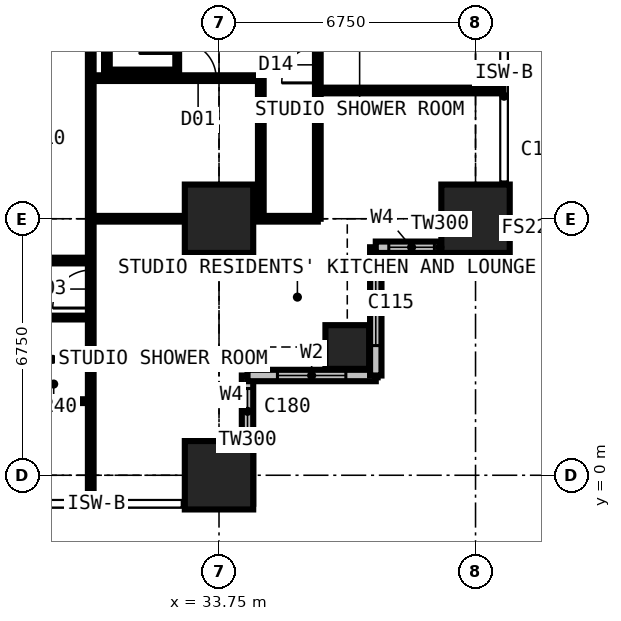
"""IFC4 building model, lengths in metres.
Left out: names, types, materials, properties, quantities, classifications, styles, units other than length and angle.
Written with IfcOpenShell. Run it as: python <this file> out.ifc"""

import sys

from ifc_helpers import new_model, si_unit, direction, frame, frame_2d, origin, origin_2d, place, context, subcontext, project, spatial, rectangle, extrude, element, fill, save


model = new_model("IFC4")
c1 = context("Model", 3, precision=1e-05, world=origin(), true_north=direction((0.0, 1.0)))
c2 = subcontext(c1, "Body", "Model", "MODEL_VIEW")
j1 = project(units=[si_unit("LENGTHUNIT", "METRE"), si_unit("PLANEANGLEUNIT", "RADIAN")], contexts=[c1])
p1 = place(None, origin())
s1 = spatial("IfcSite", under=j1, at=p1, CompositionType="ELEMENT")
p2 = place(p1, origin())
s2 = spatial("IfcBuilding", under=s1, at=p2, CompositionType="ELEMENT")
p3 = place(p2, frame((0.0, 0.0, 83.7)))
s3 = spatial("IfcBuildingStorey", under=s2, at=p3, CompositionType="ELEMENT", Elevation=83.7)
for number, where, z_axis, x_axis in (
    (1, (33.75, 0.0, 0.0), (0.0, 0.0, 1.0), (1.0, 0.0, 0.0)),
    (2, (33.75, 6.75, 0.0), (0.0, 0.0, 1.0), (1.0, 0.0, 0.0)),
):
    element("IfcColumn", number, at=place(p3, frame(where, z_axis=z_axis, x_axis=x_axis)), inside=s3, PredefinedType="COLUMN", context=c2, shape_type="SweptSolid", body=[
        extrude(rectangle(XDim=1.8, YDim=1.8, at=origin_2d()), origin(), (0.0, 0.0, 1.0), 3.6),
    ])
p4 = place(p3, frame((37.125, 3.375, 0.0), z_axis=(0.0, 0.0, 1.0), x_axis=(1.0, 0.0, 0.0)))
e3 = element("IfcColumn", 3, at=p4, inside=s3, PredefinedType="COLUMN", context=c2, shape_type="SweptSolid", body=[
    extrude(rectangle(XDim=1.15, YDim=1.15, at=origin_2d()), origin(), (0.0, 0.0, 1.0), 3.6),
])
p5 = place(p3, frame((40.5, 6.75, 0.0), z_axis=(0.0, 0.0, 1.0), x_axis=(1.0, 0.0, 0.0)))
e4 = element("IfcColumn", 4, at=p5, inside=s3, PredefinedType="COLUMN", context=c2, shape_type="SweptSolid", body=[
    extrude(rectangle(XDim=1.8, YDim=1.8, at=origin_2d()), origin(), (0.0, 0.0, 1.0), 3.6),
])
p6 = place(p3, frame((34.5, -0.75, 0.0), z_axis=(0.0, 0.0, 1.0), x_axis=(0.0, 1.0, 0.0)))
e5 = element("IfcWall", 5, at=p6, inside=s3, PredefinedType="SOLIDWALL", context=c2, shape_type="SweptSolid", body=[
    extrude(rectangle(XDim=3.375, YDim=0.3, at=frame_2d((1.688, 0.0))), origin(), (0.0, 0.0, 1.0), 3.375),
])
p7 = place(p6, frame((1.833, 0.0, 0.9)))
e6 = element("IfcOpeningElement", 6, at=p7, cuts=e5, PredefinedType="OPENING", context=c2, shape_type="SweptSolid", body=[
    extrude(rectangle(XDim=1.2, YDim=1.8, at=frame_2d((0.6, 0.9))), frame((0.0, 0.16, 0.0), z_axis=(0.0, -1.0, 0.0), x_axis=(1.0, 0.0, 0.0)), (0.0, 0.0, 1.0), 0.32),
])
p8 = place(p3, frame((34.5, 2.625, 0.0), z_axis=(0.0, 0.0, 1.0), x_axis=(1.0, 0.0, 0.0)))
e7 = element("IfcWall", 7, at=p8, inside=s3, PredefinedType="SOLIDWALL", context=c2, shape_type="SweptSolid", body=[
    extrude(rectangle(XDim=3.375, YDim=0.3, at=frame_2d((1.688, 0.0))), origin(), (0.0, 0.0, 1.0), 3.375),
])
p9 = place(p8, frame((0.788, 0.0, 0.6)))
e8 = element("IfcOpeningElement", 8, at=p9, cuts=e7, PredefinedType="OPENING", context=c2, shape_type="SweptSolid", body=[
    extrude(rectangle(XDim=1.8, YDim=2.1, at=frame_2d((0.9, 1.05))), frame((0.0, 0.16, 0.0), z_axis=(0.0, -1.0, 0.0), x_axis=(1.0, 0.0, 0.0)), (0.0, 0.0, 1.0), 0.32),
])
p10 = place(p3, frame((37.875, 2.625, 0.0), z_axis=(0.0, 0.0, 1.0), x_axis=(0.0, 1.0, 0.0)))
e9 = element("IfcWall", 9, at=p10, inside=s3, PredefinedType="SOLIDWALL", context=c2, shape_type="SweptSolid", body=[
    extrude(rectangle(XDim=3.375, YDim=0.3, at=frame_2d((1.688, 0.0))), origin(), (0.0, 0.0, 1.0), 3.375),
])
p11 = place(p10, frame((0.788, 0.0, 0.6)))
e10 = element("IfcOpeningElement", 10, at=p11, cuts=e9, PredefinedType="OPENING", context=c2, shape_type="SweptSolid", body=[
    extrude(rectangle(XDim=1.8, YDim=2.1, at=frame_2d((0.9, 1.05))), frame((0.0, 0.16, 0.0), z_axis=(0.0, -1.0, 0.0), x_axis=(1.0, 0.0, 0.0)), (0.0, 0.0, 1.0), 0.32),
])
p12 = place(p3, frame((37.875, 6.0, 0.0), z_axis=(0.0, 0.0, 1.0), x_axis=(1.0, 0.0, 0.0)))
e11 = element("IfcWall", 11, at=p12, inside=s3, PredefinedType="SOLIDWALL", context=c2, shape_type="SweptSolid", body=[
    extrude(rectangle(XDim=3.375, YDim=0.3, at=frame_2d((1.688, 0.0))), origin(), (0.0, 0.0, 1.0), 3.375),
])
p13 = place(p12, frame((0.343, 0.0, 0.9)))
e12 = element("IfcOpeningElement", 12, at=p13, cuts=e11, PredefinedType="OPENING", context=c2, shape_type="SweptSolid", body=[
    extrude(rectangle(XDim=1.2, YDim=1.8, at=frame_2d((0.6, 0.9))), frame((0.0, 0.16, 0.0), z_axis=(0.0, -1.0, 0.0), x_axis=(1.0, 0.0, 0.0)), (0.0, 0.0, 1.0), 0.32),
])
p14 = place(p3, frame((6.75, 4.15, 0.0), z_axis=(0.0, 0.0, 1.0), x_axis=(1.0, 0.0, 0.0)))
e13 = element("IfcWall", 13, at=p14, inside=s3, PredefinedType="PARTITIONING", context=c2, shape_type="SweptSolid", body=[
    extrude(rectangle(XDim=23.625, YDim=0.1, at=frame_2d((11.812, 0.0))), origin(), (0.0, 0.0, 1.0), 3.375),
])
p15 = place(p14, frame((0.2, 0.0, 0.0)))
e14 = element("IfcOpeningElement", 14, at=p15, cuts=e13, PredefinedType="OPENING", context=c2, shape_type="SweptSolid", body=[
    extrude(rectangle(XDim=0.95, YDim=2.2, at=frame_2d((0.475, 1.1))), frame((0.0, 0.06, 0.0), z_axis=(0.0, -1.0, 0.0), x_axis=(1.0, 0.0, 0.0)), (0.0, 0.0, 1.0), 0.12),
])
p16 = place(p14, frame((3.625, 0.0, 0.0)))
e15 = element("IfcOpeningElement", 15, at=p16, cuts=e13, PredefinedType="OPENING", context=c2, shape_type="SweptSolid", body=[
    extrude(rectangle(XDim=0.95, YDim=2.2, at=frame_2d((0.475, 1.1))), frame((0.0, 0.06, 0.0), z_axis=(0.0, -1.0, 0.0), x_axis=(1.0, 0.0, 0.0)), (0.0, 0.0, 1.0), 0.12),
])
p17 = place(p14, frame((7.0, 0.0, 0.0)))
e16 = element("IfcOpeningElement", 16, at=p17, cuts=e13, PredefinedType="OPENING", context=c2, shape_type="SweptSolid", body=[
    extrude(rectangle(XDim=0.95, YDim=2.2, at=frame_2d((0.475, 1.1))), frame((0.0, 0.06, 0.0), z_axis=(0.0, -1.0, 0.0), x_axis=(1.0, 0.0, 0.0)), (0.0, 0.0, 1.0), 0.12),
])
p18 = place(p14, frame((10.375, 0.0, 0.0)))
e17 = element("IfcOpeningElement", 17, at=p18, cuts=e13, PredefinedType="OPENING", context=c2, shape_type="SweptSolid", body=[
    extrude(rectangle(XDim=0.95, YDim=2.2, at=frame_2d((0.475, 1.1))), frame((0.0, 0.06, 0.0), z_axis=(0.0, -1.0, 0.0), x_axis=(1.0, 0.0, 0.0)), (0.0, 0.0, 1.0), 0.12),
])
p19 = place(p14, frame((15.1, 0.0, 0.0)))
e18 = element("IfcOpeningElement", 18, at=p19, cuts=e13, PredefinedType="OPENING", context=c2, shape_type="SweptSolid", body=[
    extrude(rectangle(XDim=0.95, YDim=2.2, at=frame_2d((0.475, 1.1))), frame((0.0, 0.06, 0.0), z_axis=(0.0, -1.0, 0.0), x_axis=(1.0, 0.0, 0.0)), (0.0, 0.0, 1.0), 0.12),
])
p20 = place(p14, frame((20.5, 0.0, 0.0)))
e19 = element("IfcOpeningElement", 19, at=p20, cuts=e13, PredefinedType="OPENING", context=c2, shape_type="SweptSolid", body=[
    extrude(rectangle(XDim=0.95, YDim=2.2, at=frame_2d((0.475, 1.1))), frame((0.0, 0.06, 0.0), z_axis=(0.0, -1.0, 0.0), x_axis=(1.0, 0.0, 0.0)), (0.0, 0.0, 1.0), 0.12),
])
p21 = place(p3, frame((22.988, 5.65, 0.0), z_axis=(0.0, 0.0, 1.0), x_axis=(1.0, 0.0, 0.0)))
e20 = element("IfcWall", 20, at=p21, inside=s3, PredefinedType="PARTITIONING", context=c2, shape_type="SweptSolid", body=[
    extrude(rectangle(XDim=7.387, YDim=0.15, at=frame_2d((3.694, 0.0))), origin(), (0.0, 0.0, 1.0), 3.375),
])
p22 = place(p21, frame((2.0, 0.0, 0.0)))
e21 = element("IfcOpeningElement", 21, at=p22, cuts=e20, PredefinedType="OPENING", context=c2, shape_type="SweptSolid", body=[
    extrude(rectangle(XDim=0.95, YDim=2.2, at=frame_2d((0.475, 1.1))), frame((0.0, 0.085, 0.0), z_axis=(0.0, -1.0, 0.0), x_axis=(1.0, 0.0, 0.0)), (0.0, 0.0, 1.0), 0.17),
])
p23 = place(p3, frame((28.375, 1.95, 0.0), z_axis=(0.0, 0.0, 1.0), x_axis=(1.0, 0.0, 0.0)))
e22 = element("IfcWall", 22, at=p23, inside=s3, PredefinedType="PARTITIONING", context=c2, shape_type="SweptSolid", body=[
    extrude(rectangle(XDim=2.0, YDim=0.1, at=frame_2d((1.0, 0.0))), origin(), (0.0, 0.0, 1.0), 3.375),
])
p24 = place(p3, frame((30.375, -0.734, 0.0), z_axis=(0.0, 0.0, 1.0), x_axis=(0.0, 1.0, 0.0)))
e23 = element("IfcWall", 23, at=p24, inside=s3, PredefinedType="PARTITIONING", context=c2, shape_type="SweptSolid", body=[
    extrude(rectangle(XDim=12.034, YDim=0.15, at=frame_2d((6.017, 0.0))), origin(), (0.0, 0.0, 1.0), 3.375),
])
p25 = place(p24, frame((5.134, 0.0, 0.0)))
e24 = element("IfcOpeningElement", 24, at=p25, cuts=e23, PredefinedType="OPENING", context=c2, shape_type="SweptSolid", body=[
    extrude(rectangle(XDim=1.0, YDim=2.2, at=frame_2d((0.5, 1.1))), frame((0.0, 0.085, 0.0), z_axis=(0.0, -1.0, 0.0), x_axis=(1.0, 0.0, 0.0)), (0.0, 0.0, 1.0), 0.17),
])
p26 = place(p3, frame((30.375, 6.75, 0.0), z_axis=(0.0, 0.0, 1.0), x_axis=(1.0, 0.0, 0.0)))
e25 = element("IfcWall", 25, at=p26, inside=s3, PredefinedType="PARTITIONING", context=c2, shape_type="SweptSolid", body=[
    extrude(rectangle(XDim=5.975, YDim=0.15, at=frame_2d((2.988, 0.0))), origin(), (0.0, 0.0, 1.0), 2.877),
])
p27 = place(p3, frame((30.375, 10.45, 0.0), z_axis=(0.0, 0.0, 1.0), x_axis=(1.0, 0.0, 0.0)))
e26 = element("IfcWall", 26, at=p27, inside=s3, PredefinedType="PARTITIONING", context=c2, shape_type="SweptSolid", body=[
    extrude(rectangle(XDim=4.475, YDim=0.15, at=frame_2d((2.238, 0.0))), origin(), (0.0, 0.0, 1.0), 3.375),
])
p28 = place(p27, frame((2.35, 0.0, 0.0)))
e27 = element("IfcOpeningElement", 27, at=p28, cuts=e26, PredefinedType="OPENING", context=c2, shape_type="SweptSolid", body=[
    extrude(rectangle(XDim=0.95, YDim=2.2, at=frame_2d((0.475, 1.1))), frame((0.0, 0.085, 0.0), z_axis=(0.0, -1.0, 0.0), x_axis=(1.0, 0.0, 0.0)), (0.0, 0.0, 1.0), 0.17),
])
p29 = place(p3, frame((30.8, 10.6, 0.0), z_axis=(0.0, 0.0, 1.0), x_axis=(0.0, 1.0, 0.0)))
e28 = element("IfcWall", 28, at=p29, inside=s3, PredefinedType="PARTITIONING", context=c2, shape_type="SweptSolid", body=[
    extrude(rectangle(XDim=0.7, YDim=0.15, at=frame_2d((0.35, 0.0))), origin(), (0.0, 0.0, 1.0), 3.375),
])
p30 = place(p3, frame((30.8, 10.6, 0.0), z_axis=(0.0, 0.0, 1.0), x_axis=(1.0, 0.0, 0.0)))
e29 = element("IfcWall", 29, at=p30, inside=s3, PredefinedType="PARTITIONING", context=c2, shape_type="SweptSolid", body=[
    extrude(rectangle(XDim=1.85, YDim=0.15, at=frame_2d((0.925, 0.0))), origin(), (0.0, 0.0, 1.0), 3.375),
])
p31 = place(p3, frame((32.65, 10.6, 0.0), z_axis=(0.0, 0.0, 1.0), x_axis=(0.0, 1.0, 0.0)))
e30 = element("IfcWall", 30, at=p31, inside=s3, PredefinedType="SHEAR", context=c2, shape_type="SweptSolid", body=[
    extrude(rectangle(XDim=9.3, YDim=0.1, at=frame_2d((4.65, 0.0))), origin(), (0.0, 0.0, 1.0), 3.375),
])
p32 = place(p31, frame((0.5, 0.0, 0.0)))
e31 = element("IfcOpeningElement", 31, at=p32, cuts=e30, PredefinedType="OPENING", context=c2, shape_type="SweptSolid", body=[
    extrude(rectangle(XDim=1.0, YDim=2.2, at=frame_2d((0.5, 1.1))), frame((0.0, 0.06, 0.0), z_axis=(0.0, -1.0, 0.0), x_axis=(1.0, 0.0, 0.0)), (0.0, 0.0, 1.0), 0.12),
])
p33 = place(p3, frame((34.85, 6.75, 0.0), z_axis=(0.0, 0.0, 1.0), x_axis=(0.0, 1.0, 0.0)))
e32 = element("IfcWall", 32, at=p33, inside=s3, PredefinedType="PARTITIONING", context=c2, shape_type="SweptSolid", body=[
    extrude(rectangle(XDim=3.7, YDim=0.15, at=frame_2d((1.85, 0.0))), origin(), (0.0, 0.0, 1.0), 3.375),
])
p34 = place(p3, frame((36.35, 6.75, 0.0), z_axis=(0.0, 0.0, 1.0), x_axis=(0.0, 1.0, 0.0)))
e33 = element("IfcWall", 33, at=p34, inside=s3, PredefinedType="PARTITIONING", context=c2, shape_type="SweptSolid", body=[
    extrude(rectangle(XDim=20.25, YDim=0.15, at=frame_2d((10.125, 0.0))), origin(), (0.0, 0.0, 1.0), 3.375),
])
p35 = place(p34, frame((15.1, 0.0, 0.0)))
e34 = element("IfcOpeningElement", 34, at=p35, cuts=e33, PredefinedType="OPENING", context=c2, shape_type="SweptSolid", body=[
    extrude(rectangle(XDim=0.95, YDim=2.2, at=frame_2d((0.475, 1.1))), frame((0.0, 0.085, 0.0), z_axis=(0.0, -1.0, 0.0), x_axis=(1.0, 0.0, 0.0)), (0.0, 0.0, 1.0), 0.17),
])
p36 = place(p34, frame((8.35, 0.0, 0.0)))
e35 = element("IfcOpeningElement", 35, at=p36, cuts=e33, PredefinedType="OPENING", context=c2, shape_type="SweptSolid", body=[
    extrude(rectangle(XDim=0.95, YDim=2.2, at=frame_2d((0.475, 1.1))), frame((0.0, 0.085, 0.0), z_axis=(0.0, -1.0, 0.0), x_axis=(1.0, 0.0, 0.0)), (0.0, 0.0, 1.0), 0.17),
])
p37 = place(p34, frame((3.575, 0.0, 0.0)))
e36 = element("IfcOpeningElement", 36, at=p37, cuts=e33, PredefinedType="OPENING", context=c2, shape_type="SweptSolid", body=[
    extrude(rectangle(XDim=0.95, YDim=2.2, at=frame_2d((0.475, 1.1))), frame((0.0, 0.085, 0.0), z_axis=(0.0, -1.0, 0.0), x_axis=(1.0, 0.0, 0.0)), (0.0, 0.0, 1.0), 0.17),
])
p38 = place(p3, frame((36.35, 10.125, 0.0), z_axis=(0.0, 0.0, 1.0), x_axis=(1.0, 0.0, 0.0)))
e37 = element("IfcWall", 37, at=p38, inside=s3, PredefinedType="PARTITIONING", context=c2, shape_type="SweptSolid", body=[
    extrude(rectangle(XDim=4.884, YDim=0.15, at=frame_2d((2.442, 0.0))), origin(), (0.0, 0.0, 1.0), 3.375),
])
p39 = place(p7, origin())
e38 = element("IfcWindow", 38, at=p39, inside=s3, PartitioningType="SINGLE_PANEL", PredefinedType="WINDOW", context=c2, shape_type="SweptSolid", body=[
    extrude(rectangle(XDim=1.2, YDim=1.8, at=frame_2d((0.6, 0.9))), frame((0.0, 0.03, 0.0), z_axis=(0.0, -1.0, 0.0), x_axis=(1.0, 0.0, 0.0)), (0.0, 0.0, 1.0), 0.06),
])
fill(e6, e38)
p40 = place(p9, origin())
e39 = element("IfcWindow", 39, at=p40, inside=s3, PartitioningType="SINGLE_PANEL", PredefinedType="WINDOW", context=c2, shape_type="SweptSolid", body=[
    extrude(rectangle(XDim=1.8, YDim=2.1, at=frame_2d((0.9, 1.05))), frame((0.0, 0.03, 0.0), z_axis=(0.0, -1.0, 0.0), x_axis=(1.0, 0.0, 0.0)), (0.0, 0.0, 1.0), 0.06),
])
fill(e8, e39)
p41 = place(p11, origin())
e40 = element("IfcWindow", 40, at=p41, inside=s3, PartitioningType="SINGLE_PANEL", PredefinedType="WINDOW", context=c2, shape_type="SweptSolid", body=[
    extrude(rectangle(XDim=1.8, YDim=2.1, at=frame_2d((0.9, 1.05))), frame((0.0, 0.03, 0.0), z_axis=(0.0, -1.0, 0.0), x_axis=(1.0, 0.0, 0.0)), (0.0, 0.0, 1.0), 0.06),
])
fill(e10, e40)
p42 = place(p13, origin())
e41 = element("IfcWindow", 41, at=p42, inside=s3, PartitioningType="SINGLE_PANEL", PredefinedType="WINDOW", context=c2, shape_type="SweptSolid", body=[
    extrude(rectangle(XDim=1.2, YDim=1.8, at=frame_2d((0.6, 0.9))), frame((0.0, 0.03, 0.0), z_axis=(0.0, -1.0, 0.0), x_axis=(1.0, 0.0, 0.0)), (0.0, 0.0, 1.0), 0.06),
])
fill(e12, e41)
p43 = place(p25, origin())
e42 = element("IfcDoor", 42, at=p43, inside=s3, OperationType="SINGLE_SWING_LEFT", PredefinedType="DOOR", context=c2, shape_type="SweptSolid", body=[
    extrude(rectangle(XDim=1.0, YDim=2.2, at=frame_2d((0.5, 1.1))), frame((0.0, 0.025, 0.0), z_axis=(0.0, -1.0, 0.0), x_axis=(1.0, 0.0, 0.0)), (0.0, 0.0, 1.0), 0.05),
])
fill(e24, e42)
p44 = place(p37, origin())
e43 = element("IfcDoor", 43, at=p44, inside=s3, OperationType="SINGLE_SWING_LEFT", PredefinedType="DOOR", context=c2, shape_type="SweptSolid", body=[
    extrude(rectangle(XDim=0.95, YDim=2.2, at=frame_2d((0.475, 1.1))), frame((0.0, 0.025, 0.0), z_axis=(0.0, -1.0, 0.0), x_axis=(1.0, 0.0, 0.0)), (0.0, 0.0, 1.0), 0.05),
])
fill(e36, e43)
p45 = place(p32, origin())
e44 = element("IfcDoor", 44, at=p45, inside=s3, OperationType="SINGLE_SWING_LEFT", PredefinedType="DOOR", context=c2, shape_type="SweptSolid", body=[
    extrude(rectangle(XDim=1.0, YDim=2.2, at=frame_2d((0.5, 1.1))), frame((0.0, 0.025, 0.0), z_axis=(0.0, -1.0, 0.0), x_axis=(1.0, 0.0, 0.0)), (0.0, 0.0, 1.0), 0.05),
])
fill(e31, e44)
p46 = place(p28, origin())
e45 = element("IfcDoor", 45, at=p46, inside=s3, OperationType="SINGLE_SWING_LEFT", PredefinedType="DOOR", context=c2, shape_type="SweptSolid", body=[
    extrude(rectangle(XDim=0.95, YDim=2.2, at=frame_2d((0.475, 1.1))), frame((0.0, 0.025, 0.0), z_axis=(0.0, -1.0, 0.0), x_axis=(1.0, 0.0, 0.0)), (0.0, 0.0, 1.0), 0.05),
])
fill(e27, e45)
save(model, sys.argv[1])
